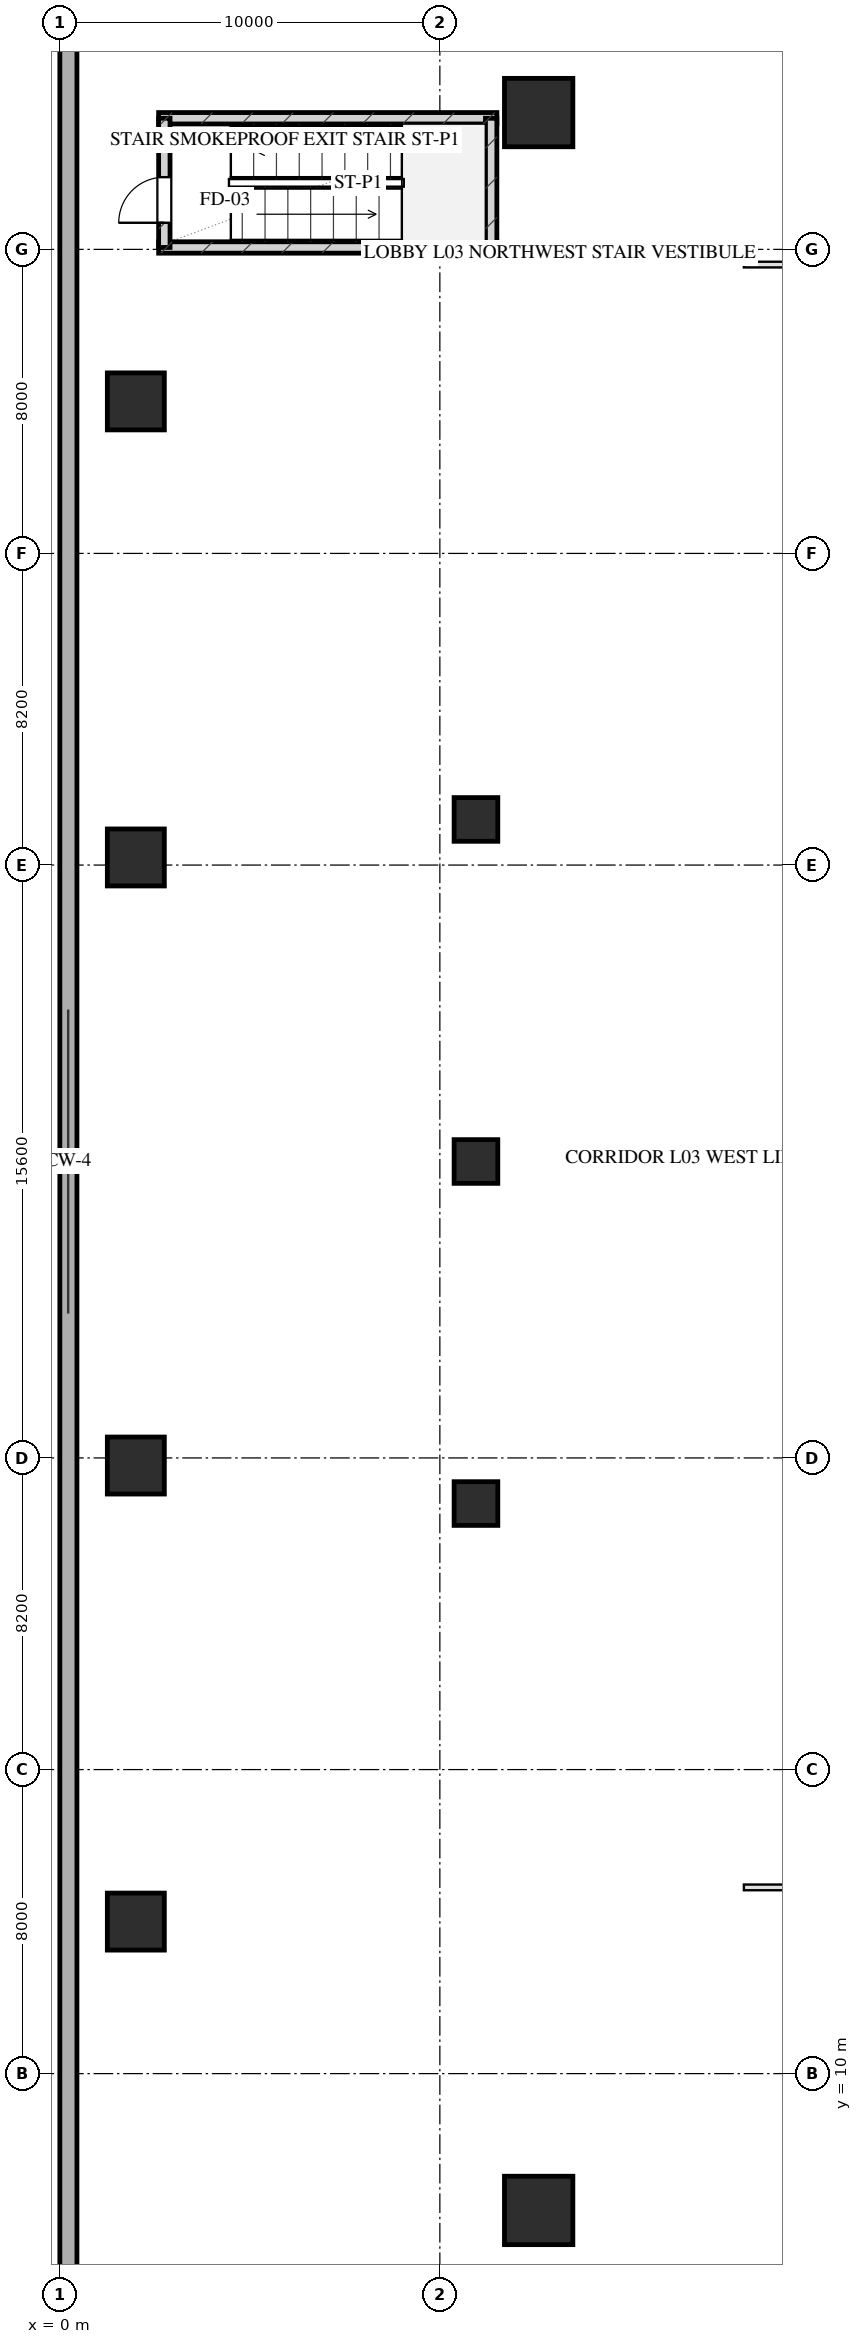
"""IFC4 building model, lengths in metres.
Left out: names, types, materials, properties, quantities, classifications, styles, units other than length and angle.
Written with IfcOpenShell. Run it as: python <this file> out.ifc"""

import sys

from ifc_helpers import new_model, si_unit, direction, frame, frame_2d, origin, origin_2d, place, context, subcontext, project, spatial, rectangle, hollow_rectangle, extrude, element, fill, save


model = new_model("IFC4")
c1 = context("Model", 3, precision=1e-05, world=origin(), true_north=direction((0.0, 1.0)))
c2 = subcontext(c1, "Body", "Model", "MODEL_VIEW")
j1 = project(units=[si_unit("LENGTHUNIT", "METRE"), si_unit("PLANEANGLEUNIT", "RADIAN")], contexts=[c1])
p1 = place(None, origin())
s1 = spatial("IfcSite", under=j1, at=p1, CompositionType="ELEMENT")
p2 = place(p1, origin())
s2 = spatial("IfcBuilding", under=s1, at=p2, CompositionType="ELEMENT")
p3 = place(p2, frame((0.0, 0.0, 16.5)))
s3 = spatial("IfcBuildingStorey", under=s2, at=p3, CompositionType="ELEMENT", Elevation=16.5)
for number, where, z_axis, x_axis in (
    (1, (2.6, 58.05, 0.0), (0.0, 0.0, 1.0), (1.0, 0.0, 0.0)),
    (2, (2.6, 61.45, 0.0), (0.0, 0.0, 1.0), (1.0, 0.0, 0.0)),
):
    element("IfcWall", number, at=place(p3, frame(where, z_axis=z_axis, x_axis=x_axis)), inside=s3, PredefinedType="SHEAR", context=c2, shape_type="SweptSolid", body=[
        extrude(rectangle(XDim=8.9, YDim=0.3, at=frame_2d((4.45, 0.0))), origin(), (0.0, 0.0, 1.0), 5.5),
    ])
p4 = place(p3, frame((11.35, 58.05, 0.0), z_axis=(0.0, 0.0, 1.0), x_axis=(0.0, 1.0, 0.0)))
e3 = element("IfcWall", 3, at=p4, inside=s3, PredefinedType="SHEAR", context=c2, shape_type="SweptSolid", body=[
    extrude(rectangle(XDim=3.4, YDim=0.3, at=frame_2d((1.7, 0.0))), origin(), (0.0, 0.0, 1.0), 5.5),
])
p5 = place(p3, frame((2.75, 58.05, 0.0), z_axis=(0.0, 0.0, 1.0), x_axis=(0.0, 1.0, 0.0)))
e4 = element("IfcWall", 4, at=p5, inside=s3, PredefinedType="SHEAR", context=c2, shape_type="SweptSolid", body=[
    extrude(rectangle(XDim=3.4, YDim=0.3, at=frame_2d((1.7, 0.0))), origin(), (0.0, 0.0, 1.0), 5.5),
])
p6 = place(p5, frame((0.65, 0.0, 0.0)))
e5 = element("IfcOpeningElement", 5, at=p6, cuts=e4, PredefinedType="OPENING", context=c2, shape_type="SweptSolid", body=[
    extrude(rectangle(XDim=1.2, YDim=2.05, at=frame_2d((0.6, 1.025))), frame((0.0, 0.16, 0.0), z_axis=(0.0, -1.0, 0.0), x_axis=(1.0, 0.0, 0.0)), (0.0, 0.0, 1.0), 0.32),
])
for number, where, z_axis, x_axis in (
    (6, (2.0, 14.0, 0.0), (0.0, 0.0, 1.0), (1.0, 0.0, 0.0)),
    (7, (2.0, 26.0, 0.0), (0.0, 0.0, 1.0), (1.0, 0.0, 0.0)),
    (8, (2.0, 42.0, 0.0), (0.0, 0.0, 1.0), (1.0, 0.0, 0.0)),
    (9, (2.0, 54.0, 0.0), (0.0, 0.0, 1.0), (1.0, 0.0, 0.0)),
):
    element("IfcColumn", number, at=place(p3, frame(where, z_axis=z_axis, x_axis=x_axis)), inside=s3, PredefinedType="COLUMN", context=c2, shape_type="SweptSolid", body=[
        extrude(rectangle(XDim=1.5, YDim=1.5, at=origin_2d()), origin(), (0.0, 0.0, 1.0), 5.501),
    ])
for number, where, z_axis, x_axis in (
    (10, (12.6, 6.4, 0.0), (0.0, 0.0, 1.0), (1.0, 0.0, 0.0)),
    (11, (12.6, 61.6, 0.0), (0.0, 0.0, 1.0), (1.0, 0.0, 0.0)),
):
    element("IfcColumn", number, at=place(p3, frame(where, z_axis=z_axis, x_axis=x_axis)), inside=s3, PredefinedType="COLUMN", context=c2, shape_type="SweptSolid", body=[
        extrude(hollow_rectangle(XDim=1.8, YDim=1.8, WallThickness=0.06, at=origin_2d()), origin(), (0.0, 0.0, 1.0), 5.501),
    ])
for number, where, z_axis, x_axis in (
    (12, (10.95, 25.0, 0.0), (0.0, 0.0, 1.0), (1.0, 0.0, 0.0)),
    (13, (10.95, 34.0, 0.0), (0.0, 0.0, 1.0), (1.0, 0.0, 0.0)),
    (14, (10.95, 43.0, 0.0), (0.0, 0.0, 1.0), (1.0, 0.0, 0.0)),
):
    element("IfcColumn", number, at=place(p3, frame(where, z_axis=z_axis, x_axis=x_axis)), inside=s3, PredefinedType="COLUMN", context=c2, shape_type="SweptSolid", body=[
        extrude(hollow_rectangle(XDim=1.15, YDim=1.15, WallThickness=0.04, at=origin_2d()), origin(), (0.0, 0.0, 1.0), 5.501),
    ])
p7 = place(p3, frame((0.225, 0.0, 0.0), z_axis=(0.0, 0.0, 1.0), x_axis=(0.0, 1.0, 0.0)))
e15 = element("IfcWall", 15, at=p7, inside=s3, PredefinedType="SOLIDWALL", context=c2, shape_type="SweptSolid", body=[
    extrude(rectangle(XDim=68.0, YDim=0.45, at=frame_2d((34.0, 0.0))), origin(), (0.0, 0.0, 1.0), 5.2),
])
p8 = place(p3, frame((18.0, 14.9, 0.0), z_axis=(0.0, 0.0, 1.0), x_axis=(1.0, 0.0, 0.0)))
e16 = element("IfcWall", 16, at=p8, inside=s3, PredefinedType="PARTITIONING", context=c2, shape_type="SweptSolid", body=[
    extrude(rectangle(XDim=88.0, YDim=0.15, at=frame_2d((44.0, 0.0))), origin(), (0.0, 0.0, 1.0), 2.325),
])
p9 = place(p8, frame((21.8, 0.0, 0.0)))
e17 = element("IfcOpeningElement", 17, at=p9, cuts=e16, PredefinedType="OPENING", context=c2, shape_type="SweptSolid", body=[
    extrude(rectangle(XDim=1.5, YDim=2.05, at=frame_2d((0.75, 1.025))), frame((0.0, 0.085, 0.0), z_axis=(0.0, -1.0, 0.0), x_axis=(1.0, 0.0, 0.0)), (0.0, 0.0, 1.0), 0.17),
])
p10 = place(p3, frame((18.0, 57.6, 0.0), z_axis=(0.0, 0.0, 1.0), x_axis=(1.0, 0.0, 0.0)))
e18 = element("IfcWall", 18, at=p10, inside=s3, PredefinedType="PARTITIONING", context=c2, shape_type="SweptSolid", body=[
    extrude(rectangle(XDim=23.5, YDim=0.15, at=frame_2d((11.75, 0.0))), origin(), (0.0, 0.0, 1.0), 5.185),
])
p11 = place(p10, frame((8.0, 0.0, 0.0)))
e19 = element("IfcOpeningElement", 19, at=p11, cuts=e18, PredefinedType="OPENING", context=c2, shape_type="SweptSolid", body=[
    extrude(rectangle(XDim=1.5, YDim=2.05, at=frame_2d((0.75, 1.025))), frame((0.0, 0.085, 0.0), z_axis=(0.0, -1.0, 0.0), x_axis=(1.0, 0.0, 0.0)), (0.0, 0.0, 1.0), 0.17),
])
p12 = place(p6, origin())
e20 = element("IfcDoor", 20, at=p12, inside=s3, OperationType="SINGLE_SWING_LEFT", PredefinedType="DOOR", context=c2, shape_type="SweptSolid", body=[
    extrude(rectangle(XDim=1.2, YDim=2.05, at=frame_2d((0.6, 1.025))), frame((0.0, 0.025, 0.0), z_axis=(0.0, -1.0, 0.0), x_axis=(1.0, 0.0, 0.0)), (0.0, 0.0, 1.0), 0.05),
])
fill(e5, e20)
save(model, sys.argv[1])
